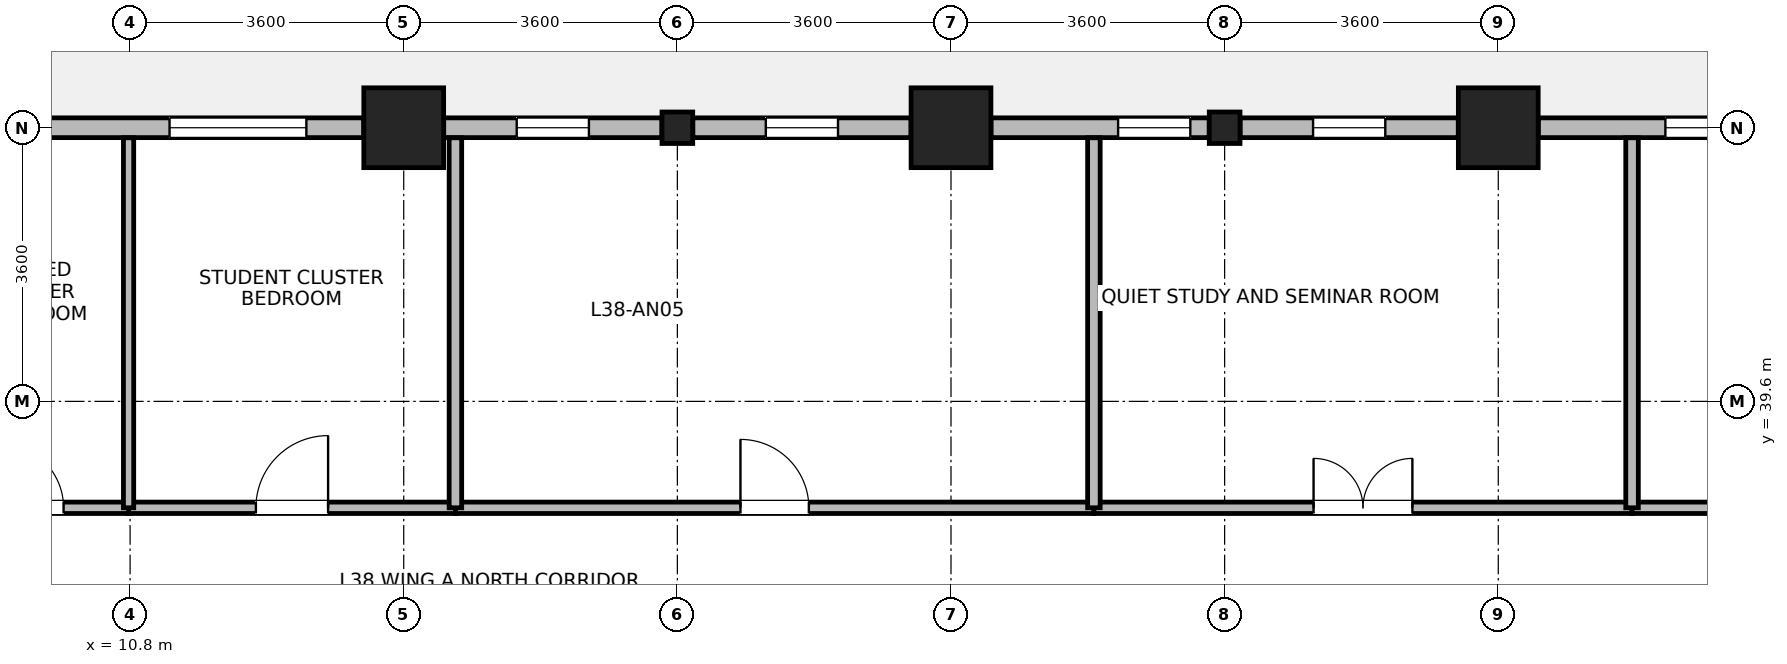
"""IFC4 building model, lengths in metres.
Left out: names, types, materials, properties, quantities, classifications, styles, units other than length and angle.
Written with IfcOpenShell. Run it as: python <this file> out.ifc"""

import sys

from ifc_helpers import new_model, si_unit, direction, frame, frame_2d, origin, origin_2d, place, context, subcontext, project, spatial, rectangle, i_section, extrude, source, transform, mapped, element, fill, save


model = new_model("IFC4")
c1 = context("Model", 3, precision=1e-05, world=origin(), true_north=direction((0.0, 1.0)))
c2 = subcontext(c1, "Body", "Model", "MODEL_VIEW")
j1 = project(units=[si_unit("LENGTHUNIT", "METRE"), si_unit("PLANEANGLEUNIT", "RADIAN")], contexts=[c1])
p1 = place(None, origin())
s1 = spatial("IfcSite", under=j1, at=p1, CompositionType="ELEMENT")
p2 = place(p1, origin())
s2 = spatial("IfcBuilding", under=s1, at=p2, CompositionType="ELEMENT")
p3 = place(p2, frame((0.0, 0.0, 151.3)))
s3 = spatial("IfcBuildingStorey", under=s2, at=p3, CompositionType="ELEMENT", Elevation=151.3)
m1 = source(origin(), c2, "Body", "SweptSolid", [
    extrude(rectangle(XDim=1.05, YDim=1.05, at=origin_2d()), origin(), (0.0, 0.0, 1.0), 3.7),
])
for number, where, z_axis, x_axis in (
    (1, (14.4, 43.2, 0.0), (0.0, 0.0, 1.0), (1.0, 0.0, 0.0)),
    (2, (21.6, 43.2, 0.0), (0.0, 0.0, 1.0), (1.0, 0.0, 0.0)),
    (3, (28.8, 43.2, 0.0), (0.0, 0.0, 1.0), (1.0, 0.0, 0.0)),
):
    element("IfcColumn", number, at=place(p3, frame(where, z_axis=z_axis, x_axis=x_axis)), inside=s3, PredefinedType="COLUMN", context=c2, shape_type="MappedRepresentation", body=[
        mapped(m1, transform((0.0, 0.0, 0.0), x_axis=(1.0, 0.0, 0.0), y_axis=(0.0, 1.0, 0.0), z_axis=(0.0, 0.0, 1.0), scale=1.0)),
    ])
m2 = source(origin(), c2, "Body", "SweptSolid", [
    extrude(i_section(OverallWidth=0.404, OverallDepth=0.414, WebThickness=0.021, FlangeThickness=0.028, FilletRadius=0.015, at=origin_2d()), origin(), (0.0, 0.0, 1.0), 3.7),
])
for number, where, z_axis, x_axis in (
    (4, (18.0, 43.2, 0.0), (0.0, 0.0, 1.0), (1.0, 0.0, 0.0)),
    (5, (25.2, 43.2, 0.0), (0.0, 0.0, 1.0), (1.0, 0.0, 0.0)),
):
    element("IfcColumn", number, at=place(p3, frame(where, z_axis=z_axis, x_axis=x_axis)), inside=s3, PredefinedType="COLUMN", context=c2, shape_type="MappedRepresentation", body=[
        mapped(m2, transform((0.0, 0.0, 0.0), x_axis=(1.0, 0.0, 0.0), y_axis=(0.0, 1.0, 0.0), z_axis=(0.0, 0.0, 1.0), scale=1.0)),
    ])
p4 = place(p3, frame((29.326, 43.2, 0.0), z_axis=(0.0, 0.0, 1.0), x_axis=(1.0, 0.0, 0.0)))
e6 = element("IfcWall", 6, at=p4, inside=s3, PredefinedType="STANDARD", context=c2, shape_type="SweptSolid", body=[
    extrude(rectangle(XDim=2.871, YDim=0.26, at=frame_2d((1.436, 0.0))), origin(), (0.0, 0.0, 1.0), 2.99),
])
p5 = place(p4, frame((1.673, 0.0, 0.85)))
e7 = element("IfcOpeningElement", 7, at=p5, cuts=e6, PredefinedType="OPENING", context=c2, shape_type="SweptSolid", body=[
    extrude(rectangle(XDim=0.95, YDim=1.75, at=frame_2d((0.475, 0.875))), frame((0.0, 0.14, 0.0), z_axis=(0.0, -1.0, 0.0), x_axis=(1.0, 0.0, 0.0)), (0.0, 0.0, 1.0), 0.28),
])
p6 = place(p3, frame((25.403, 43.2, 0.0), z_axis=(0.0, 0.0, 1.0), x_axis=(1.0, 0.0, 0.0)))
e8 = element("IfcWall", 8, at=p6, inside=s3, PredefinedType="STANDARD", context=c2, shape_type="SweptSolid", body=[
    extrude(rectangle(XDim=2.871, YDim=0.26, at=frame_2d((1.436, 0.0))), origin(), (0.0, 0.0, 1.0), 2.99),
])
p7 = place(p6, frame((0.96, 0.0, 0.85)))
e9 = element("IfcOpeningElement", 9, at=p7, cuts=e8, PredefinedType="OPENING", context=c2, shape_type="SweptSolid", body=[
    extrude(rectangle(XDim=0.95, YDim=1.75, at=frame_2d((0.475, 0.875))), frame((0.0, 0.14, 0.0), z_axis=(0.0, -1.0, 0.0), x_axis=(1.0, 0.0, 0.0)), (0.0, 0.0, 1.0), 0.28),
])
p8 = place(p3, frame((22.126, 43.2, 0.0), z_axis=(0.0, 0.0, 1.0), x_axis=(1.0, 0.0, 0.0)))
e10 = element("IfcWall", 10, at=p8, inside=s3, PredefinedType="STANDARD", context=c2, shape_type="SweptSolid", body=[
    extrude(rectangle(XDim=2.871, YDim=0.26, at=frame_2d((1.436, 0.0))), origin(), (0.0, 0.0, 1.0), 2.99),
])
p9 = place(p8, frame((1.673, 0.0, 0.85)))
e11 = element("IfcOpeningElement", 11, at=p9, cuts=e10, PredefinedType="OPENING", context=c2, shape_type="SweptSolid", body=[
    extrude(rectangle(XDim=0.95, YDim=1.75, at=frame_2d((0.475, 0.875))), frame((0.0, 0.14, 0.0), z_axis=(0.0, -1.0, 0.0), x_axis=(1.0, 0.0, 0.0)), (0.0, 0.0, 1.0), 0.28),
])
p10 = place(p3, frame((18.203, 43.2, 0.0), z_axis=(0.0, 0.0, 1.0), x_axis=(1.0, 0.0, 0.0)))
e12 = element("IfcWall", 12, at=p10, inside=s3, PredefinedType="STANDARD", context=c2, shape_type="SweptSolid", body=[
    extrude(rectangle(XDim=2.871, YDim=0.26, at=frame_2d((1.436, 0.0))), origin(), (0.0, 0.0, 1.0), 2.99),
])
p11 = place(p10, frame((0.96, 0.0, 0.85)))
e13 = element("IfcOpeningElement", 13, at=p11, cuts=e12, PredefinedType="OPENING", context=c2, shape_type="SweptSolid", body=[
    extrude(rectangle(XDim=0.95, YDim=1.75, at=frame_2d((0.475, 0.875))), frame((0.0, 0.14, 0.0), z_axis=(0.0, -1.0, 0.0), x_axis=(1.0, 0.0, 0.0)), (0.0, 0.0, 1.0), 0.28),
])
p12 = place(p3, frame((14.926, 43.2, 0.0), z_axis=(0.0, 0.0, 1.0), x_axis=(1.0, 0.0, 0.0)))
e14 = element("IfcWall", 14, at=p12, inside=s3, PredefinedType="STANDARD", context=c2, shape_type="SweptSolid", body=[
    extrude(rectangle(XDim=2.871, YDim=0.26, at=frame_2d((1.436, 0.0))), origin(), (0.0, 0.0, 1.0), 2.99),
])
p13 = place(p12, frame((0.96, 0.0, 0.85)))
e15 = element("IfcOpeningElement", 15, at=p13, cuts=e14, PredefinedType="OPENING", context=c2, shape_type="SweptSolid", body=[
    extrude(rectangle(XDim=0.95, YDim=1.75, at=frame_2d((0.475, 0.875))), frame((0.0, 0.14, 0.0), z_axis=(0.0, -1.0, 0.0), x_axis=(1.0, 0.0, 0.0)), (0.0, 0.0, 1.0), 0.28),
])
p14 = place(p3, frame((0.635, 43.2, 0.0), z_axis=(0.0, 0.0, 1.0), x_axis=(1.0, 0.0, 0.0)))
e16 = element("IfcWall", 16, at=p14, inside=s3, PredefinedType="STANDARD", context=c2, shape_type="SweptSolid", body=[
    extrude(rectangle(XDim=13.239, YDim=0.26, at=frame_2d((6.62, 0.0))), origin(), (0.0, 0.0, 1.0), 3.44),
])
p15 = place(p14, frame((0.755, 0.0, 0.85)))
e17 = element("IfcOpeningElement", 17, at=p15, cuts=e16, PredefinedType="OPENING", context=c2, shape_type="SweptSolid", body=[
    extrude(rectangle(XDim=1.8, YDim=1.85, at=frame_2d((0.9, 0.925))), frame((0.0, 0.14, 0.0), z_axis=(0.0, -1.0, 0.0), x_axis=(1.0, 0.0, 0.0)), (0.0, 0.0, 1.0), 0.28),
])
p16 = place(p14, frame((4.065, 0.0, 0.85)))
e18 = element("IfcOpeningElement", 18, at=p16, cuts=e16, PredefinedType="OPENING", context=c2, shape_type="SweptSolid", body=[
    extrude(rectangle(XDim=1.8, YDim=1.85, at=frame_2d((0.9, 0.925))), frame((0.0, 0.14, 0.0), z_axis=(0.0, -1.0, 0.0), x_axis=(1.0, 0.0, 0.0)), (0.0, 0.0, 1.0), 0.28),
])
p17 = place(p14, frame((10.684, 0.0, 0.85)))
e19 = element("IfcOpeningElement", 19, at=p17, cuts=e16, PredefinedType="OPENING", context=c2, shape_type="SweptSolid", body=[
    extrude(rectangle(XDim=1.8, YDim=1.85, at=frame_2d((0.9, 0.925))), frame((0.0, 0.14, 0.0), z_axis=(0.0, -1.0, 0.0), x_axis=(1.0, 0.0, 0.0)), (0.0, 0.0, 1.0), 0.28),
])
p18 = place(p3, frame((15.08, 38.2, 0.0), z_axis=(0.0, 0.0, 1.0), x_axis=(1.0, 0.0, 0.0)))
e20 = element("IfcWall", 20, at=p18, inside=s3, PredefinedType="PARTITIONING", context=c2, shape_type="SweptSolid", body=[
    extrude(rectangle(XDim=8.4, YDim=0.15, at=frame_2d((4.2, 0.0))), origin(), (0.0, 0.0, 1.0), 3.44),
])
p19 = place(p18, frame((3.75, 0.0, 0.0)))
e21 = element("IfcOpeningElement", 21, at=p19, cuts=e20, PredefinedType="OPENING", context=c2, shape_type="SweptSolid", body=[
    extrude(rectangle(XDim=0.9, YDim=2.08, at=frame_2d((0.45, 1.04))), frame((0.0, 0.085, 0.0), z_axis=(0.0, -1.0, 0.0), x_axis=(1.0, 0.0, 0.0)), (0.0, 0.0, 1.0), 0.17),
])
p20 = place(p3, frame((23.48, 38.2, 0.0), z_axis=(0.0, 0.0, 1.0), x_axis=(1.0, 0.0, 0.0)))
e22 = element("IfcWall", 22, at=p20, inside=s3, PredefinedType="PARTITIONING", context=c2, shape_type="SweptSolid", body=[
    extrude(rectangle(XDim=7.08, YDim=0.15, at=frame_2d((3.54, 0.0))), origin(), (0.0, 0.0, 1.0), 3.44),
])
p21 = place(p20, frame((2.89, 0.0, 0.0)))
e23 = element("IfcOpeningElement", 23, at=p21, cuts=e22, PredefinedType="OPENING", context=c2, shape_type="SweptSolid", body=[
    extrude(rectangle(XDim=1.3, YDim=2.12, at=frame_2d((0.65, 1.06))), frame((0.0, 0.085, 0.0), z_axis=(0.0, -1.0, 0.0), x_axis=(1.0, 0.0, 0.0)), (0.0, 0.0, 1.0), 0.17),
])
p22 = place(p3, frame((30.56, 38.2, 0.0), z_axis=(0.0, 0.0, 1.0), x_axis=(1.0, 0.0, 0.0)))
e24 = element("IfcWall", 24, at=p22, inside=s3, PredefinedType="PARTITIONING", context=c2, shape_type="SweptSolid", body=[
    extrude(rectangle(XDim=4.8, YDim=0.15, at=frame_2d((2.4, 0.0))), origin(), (0.0, 0.0, 1.0), 3.44),
])
p23 = place(p22, frame((1.75, 0.0, 0.0)))
e25 = element("IfcOpeningElement", 25, at=p23, cuts=e24, PredefinedType="OPENING", context=c2, shape_type="SweptSolid", body=[
    extrude(rectangle(XDim=1.3, YDim=2.12, at=frame_2d((0.65, 1.06))), frame((0.0, 0.085, 0.0), z_axis=(0.0, -1.0, 0.0), x_axis=(1.0, 0.0, 0.0)), (0.0, 0.0, 1.0), 0.17),
])
p24 = place(p3, frame((10.78, 38.2, 0.0), z_axis=(0.0, 0.0, 1.0), x_axis=(1.0, 0.0, 0.0)))
e26 = element("IfcWall", 26, at=p24, inside=s3, PredefinedType="PARTITIONING", context=c2, shape_type="SweptSolid", body=[
    extrude(rectangle(XDim=4.3, YDim=0.15, at=frame_2d((2.15, 0.0))), origin(), (0.0, 0.0, 1.0), 3.44),
])
p25 = place(p24, frame((1.675, 0.0, 0.0)))
e27 = element("IfcOpeningElement", 27, at=p25, cuts=e26, PredefinedType="OPENING", context=c2, shape_type="SweptSolid", body=[
    extrude(rectangle(XDim=0.95, YDim=2.1, at=frame_2d((0.475, 1.05))), frame((0.0, 0.085, 0.0), z_axis=(0.0, -1.0, 0.0), x_axis=(1.0, 0.0, 0.0)), (0.0, 0.0, 1.0), 0.17),
])
p26 = place(p3, frame((8.22, 38.2, 0.0), z_axis=(0.0, 0.0, 1.0), x_axis=(1.0, 0.0, 0.0)))
e28 = element("IfcWall", 28, at=p26, inside=s3, PredefinedType="PARTITIONING", context=c2, shape_type="SweptSolid", body=[
    extrude(rectangle(XDim=2.56, YDim=0.15, at=frame_2d((1.28, 0.0))), origin(), (0.0, 0.0, 1.0), 3.44),
])
p27 = place(p26, frame((0.855, 0.0, 0.0)))
e29 = element("IfcOpeningElement", 29, at=p27, cuts=e28, PredefinedType="OPENING", context=c2, shape_type="SweptSolid", body=[
    extrude(rectangle(XDim=0.85, YDim=2.04, at=frame_2d((0.425, 1.02))), frame((0.0, 0.085, 0.0), z_axis=(0.0, -1.0, 0.0), x_axis=(1.0, 0.0, 0.0)), (0.0, 0.0, 1.0), 0.17),
])
p28 = place(p3, frame((10.78, 38.2, 0.0), z_axis=(0.0, 0.0, 1.0), x_axis=(0.0, 1.0, 0.0)))
e30 = element("IfcWall", 30, at=p28, inside=s3, PredefinedType="PARTITIONING", context=c2, shape_type="SweptSolid", body=[
    extrude(rectangle(XDim=4.868, YDim=0.135, at=frame_2d((2.434, 0.0))), origin(), (0.0, 0.0, 1.0), 3.44),
])
for number, where, z_axis, x_axis in (
    (31, (15.08, 38.2, 0.0), (0.0, 0.0, 1.0), (0.0, 1.0, 0.0)),
    (32, (23.48, 38.2, 0.0), (0.0, 0.0, 1.0), (0.0, 1.0, 0.0)),
    (33, (30.56, 38.2, 0.0), (0.0, 0.0, 1.0), (0.0, 1.0, 0.0)),
):
    element("IfcWall", number, at=place(p3, frame(where, z_axis=z_axis, x_axis=x_axis)), inside=s3, PredefinedType="PARTITIONING", context=c2, shape_type="SweptSolid", body=[
        extrude(rectangle(XDim=4.868, YDim=0.165, at=frame_2d((2.434, 0.0))), origin(), (0.0, 0.0, 1.0), 3.44),
    ])
p29 = place(p5, origin())
e34 = element("IfcWindow", 34, at=p29, inside=s3, PartitioningType="SINGLE_PANEL", PredefinedType="WINDOW", context=c2, shape_type="SweptSolid", body=[
    extrude(rectangle(XDim=0.95, YDim=1.75, at=frame_2d((0.475, 0.875))), frame((0.0, 0.03, 0.0), z_axis=(0.0, -1.0, 0.0), x_axis=(1.0, 0.0, 0.0)), (0.0, 0.0, 1.0), 0.06),
])
fill(e7, e34)
p30 = place(p7, origin())
e35 = element("IfcWindow", 35, at=p30, inside=s3, PartitioningType="SINGLE_PANEL", PredefinedType="WINDOW", context=c2, shape_type="SweptSolid", body=[
    extrude(rectangle(XDim=0.95, YDim=1.75, at=frame_2d((0.475, 0.875))), frame((0.0, 0.03, 0.0), z_axis=(0.0, -1.0, 0.0), x_axis=(1.0, 0.0, 0.0)), (0.0, 0.0, 1.0), 0.06),
])
fill(e9, e35)
p31 = place(p9, origin())
e36 = element("IfcWindow", 36, at=p31, inside=s3, PartitioningType="SINGLE_PANEL", PredefinedType="WINDOW", context=c2, shape_type="SweptSolid", body=[
    extrude(rectangle(XDim=0.95, YDim=1.75, at=frame_2d((0.475, 0.875))), frame((0.0, 0.03, 0.0), z_axis=(0.0, -1.0, 0.0), x_axis=(1.0, 0.0, 0.0)), (0.0, 0.0, 1.0), 0.06),
])
fill(e11, e36)
p32 = place(p11, origin())
e37 = element("IfcWindow", 37, at=p32, inside=s3, PartitioningType="SINGLE_PANEL", PredefinedType="WINDOW", context=c2, shape_type="SweptSolid", body=[
    extrude(rectangle(XDim=0.95, YDim=1.75, at=frame_2d((0.475, 0.875))), frame((0.0, 0.03, 0.0), z_axis=(0.0, -1.0, 0.0), x_axis=(1.0, 0.0, 0.0)), (0.0, 0.0, 1.0), 0.06),
])
fill(e13, e37)
p33 = place(p13, origin())
e38 = element("IfcWindow", 38, at=p33, inside=s3, PartitioningType="SINGLE_PANEL", PredefinedType="WINDOW", context=c2, shape_type="SweptSolid", body=[
    extrude(rectangle(XDim=0.95, YDim=1.75, at=frame_2d((0.475, 0.875))), frame((0.0, 0.03, 0.0), z_axis=(0.0, -1.0, 0.0), x_axis=(1.0, 0.0, 0.0)), (0.0, 0.0, 1.0), 0.06),
])
fill(e15, e38)
p34 = place(p17, origin())
e39 = element("IfcWindow", 39, at=p34, inside=s3, PartitioningType="SINGLE_PANEL", PredefinedType="WINDOW", context=c2, shape_type="SweptSolid", body=[
    extrude(rectangle(XDim=1.8, YDim=1.85, at=frame_2d((0.9, 0.925))), frame((0.0, 0.03, 0.0), z_axis=(0.0, -1.0, 0.0), x_axis=(1.0, 0.0, 0.0)), (0.0, 0.0, 1.0), 0.06),
])
fill(e19, e39)
p35 = place(p19, origin())
e40 = element("IfcDoor", 40, at=p35, inside=s3, OperationType="SINGLE_SWING_LEFT", PredefinedType="DOOR", context=c2, shape_type="SweptSolid", body=[
    extrude(rectangle(XDim=0.9, YDim=2.08, at=frame_2d((0.45, 1.04))), frame((0.0, 0.025, 0.0), z_axis=(0.0, -1.0, 0.0), x_axis=(1.0, 0.0, 0.0)), (0.0, 0.0, 1.0), 0.05),
])
fill(e21, e40)
p36 = place(p21, origin())
e41 = element("IfcDoor", 41, at=p36, inside=s3, OperationType="DOUBLE_DOOR_SINGLE_SWING", PredefinedType="DOOR", context=c2, shape_type="SweptSolid", body=[
    extrude(rectangle(XDim=1.3, YDim=2.12, at=frame_2d((0.65, 1.06))), frame((0.0, 0.025, 0.0), z_axis=(0.0, -1.0, 0.0), x_axis=(1.0, 0.0, 0.0)), (0.0, 0.0, 1.0), 0.05),
])
fill(e23, e41)
p37 = place(p25, origin())
e42 = element("IfcDoor", 42, at=p37, inside=s3, OperationType="SINGLE_SWING_RIGHT", PredefinedType="DOOR", context=c2, shape_type="SweptSolid", body=[
    extrude(rectangle(XDim=0.95, YDim=2.1, at=frame_2d((0.475, 1.05))), frame((0.0, 0.025, 0.0), z_axis=(0.0, -1.0, 0.0), x_axis=(1.0, 0.0, 0.0)), (0.0, 0.0, 1.0), 0.05),
])
fill(e27, e42)
p38 = place(p27, origin())
e43 = element("IfcDoor", 43, at=p38, inside=s3, OperationType="SINGLE_SWING_LEFT", PredefinedType="DOOR", context=c2, shape_type="SweptSolid", body=[
    extrude(rectangle(XDim=0.85, YDim=2.04, at=frame_2d((0.425, 1.02))), frame((0.0, 0.025, 0.0), z_axis=(0.0, -1.0, 0.0), x_axis=(1.0, 0.0, 0.0)), (0.0, 0.0, 1.0), 0.05),
])
fill(e29, e43)
save(model, sys.argv[1])
